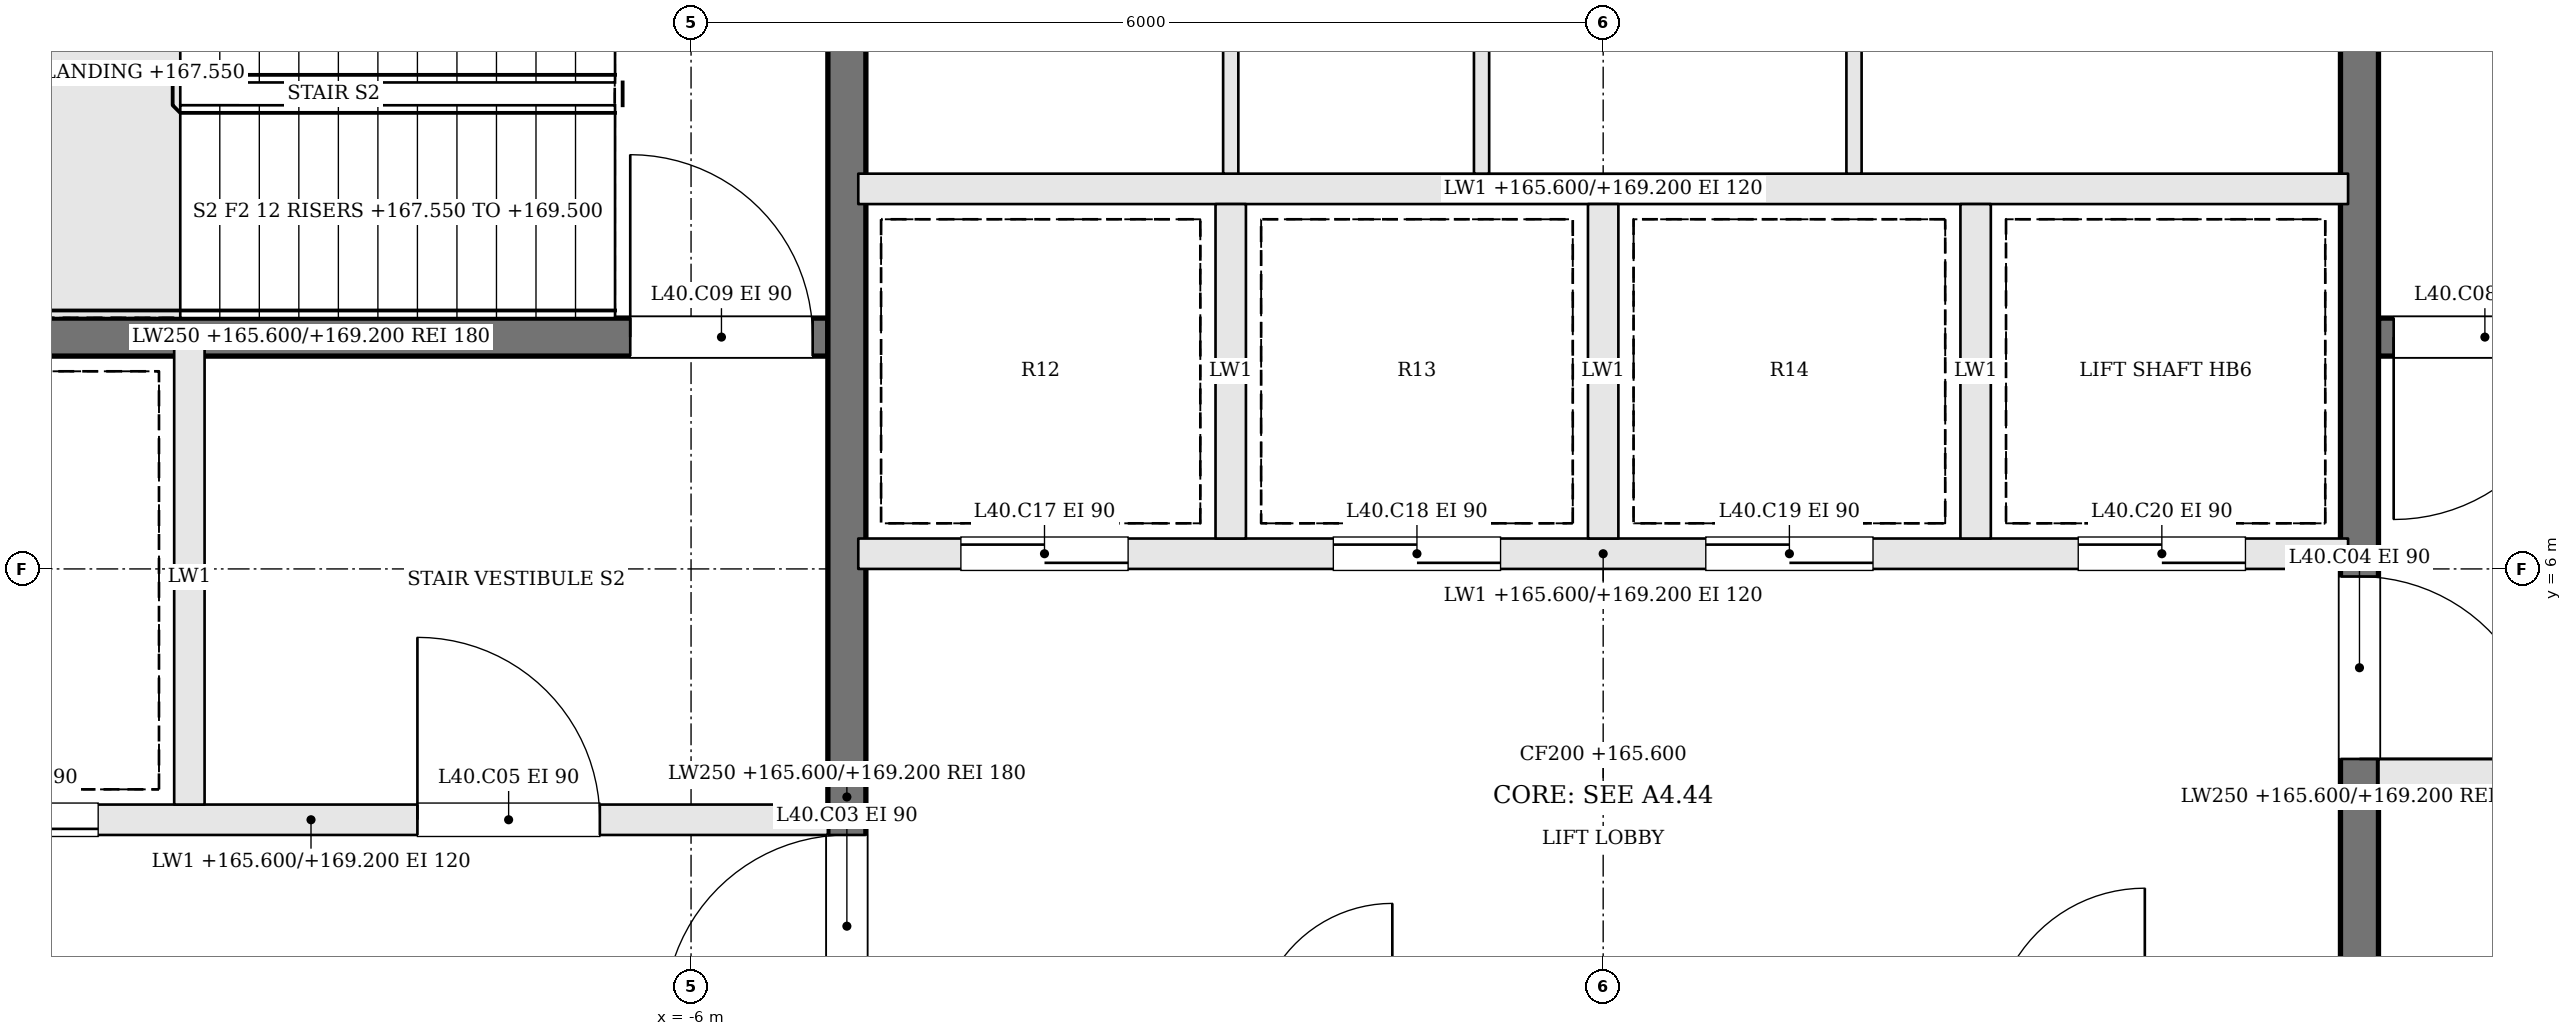
"""IFC4 building model, lengths in metres.
Left out: names, types, materials, properties, quantities, classifications, styles, units other than length and angle.
Written with IfcOpenShell. Run it as: python <this file> out.ifc"""

import sys

from ifc_helpers import new_model, si_unit, direction, frame, frame_2d, origin, place, context, subcontext, project, spatial, rectangle, extrude, element, fill, save


model = new_model("IFC4")
c1 = context("Model", 3, precision=1e-05, world=origin(), true_north=direction((0.0, 1.0)))
c2 = subcontext(c1, "Body", "Model", "MODEL_VIEW")
j1 = project(units=[si_unit("LENGTHUNIT", "METRE"), si_unit("PLANEANGLEUNIT", "RADIAN")], contexts=[c1])
p1 = place(None, origin())
s1 = spatial("IfcSite", under=j1, at=p1, CompositionType="ELEMENT")
p2 = place(p1, origin())
s2 = spatial("IfcBuilding", under=s1, at=p2, CompositionType="ELEMENT")
p3 = place(p2, frame((0.0, 0.0, 165.6)))
s3 = spatial("IfcBuildingStorey", under=s2, at=p3, CompositionType="ELEMENT", Elevation=165.6)
p4 = place(p3, frame((11.9, 7.525, 0.0), z_axis=(0.0, 0.0, 1.0), x_axis=(-1.0, 0.0, 0.0)))
e1 = element("IfcWall", 1, at=p4, inside=s3, PredefinedType="SOLIDWALL", context=c2, shape_type="SweptSolid", body=[
    extrude(rectangle(XDim=6.8, YDim=0.25, at=frame_2d((3.4, 0.0))), origin(), (0.0, 0.0, 1.0), 3.6),
])
p5 = place(p4, frame((5.5, 0.0, 0.0)))
e2 = element("IfcOpeningElement", 2, at=p5, cuts=e1, PredefinedType="OPENING", context=c2, shape_type="SweptSolid", body=[
    extrude(rectangle(XDim=1.2, YDim=2.1, at=frame_2d((0.6, 1.05))), frame((0.0, 0.135, 0.0), z_axis=(0.0, -1.0, 0.0), x_axis=(1.0, 0.0, 0.0)), (0.0, 0.0, 1.0), 0.27),
])
p6 = place(p3, frame((-11.9, 4.35, 0.0), z_axis=(0.0, 0.0, 1.0), x_axis=(1.0, 0.0, 0.0)))
e3 = element("IfcWall", 3, at=p6, inside=s3, PredefinedType="SOLIDWALL", context=c2, shape_type="SweptSolid", body=[
    extrude(rectangle(XDim=6.8, YDim=0.2, at=frame_2d((3.4, 0.0))), origin(), (0.0, 0.0, 1.0), 3.6),
])
p7 = place(p6, frame((4.1, 0.0, 0.0)))
e4 = element("IfcOpeningElement", 4, at=p7, cuts=e3, PredefinedType="OPENING", context=c2, shape_type="SweptSolid", body=[
    extrude(rectangle(XDim=1.2, YDim=2.1, at=frame_2d((0.6, 1.05))), frame((0.0, 0.11, 0.0), z_axis=(0.0, -1.0, 0.0), x_axis=(1.0, 0.0, 0.0)), (0.0, 0.0, 1.0), 0.22),
])
p8 = place(p6, frame((0.8, 0.0, 0.0)))
e5 = element("IfcOpeningElement", 5, at=p8, cuts=e3, PredefinedType="OPENING", context=c2, shape_type="SweptSolid", body=[
    extrude(rectangle(XDim=1.2, YDim=2.1, at=frame_2d((0.6, 1.05))), frame((0.0, 0.11, 0.0), z_axis=(0.0, -1.0, 0.0), x_axis=(1.0, 0.0, 0.0)), (0.0, 0.0, 1.0), 0.22),
])
p9 = place(p3, frame((11.9, 4.65, 0.0), z_axis=(0.0, 0.0, 1.0), x_axis=(-1.0, 0.0, 0.0)))
e6 = element("IfcWall", 6, at=p9, inside=s3, PredefinedType="SOLIDWALL", context=c2, shape_type="SweptSolid", body=[
    extrude(rectangle(XDim=6.8, YDim=0.2, at=frame_2d((3.4, 0.0))), origin(), (0.0, 0.0, 1.0), 3.6),
])
p10 = place(p9, frame((4.1, 0.0, 0.0)))
e7 = element("IfcOpeningElement", 7, at=p10, cuts=e6, PredefinedType="OPENING", context=c2, shape_type="SweptSolid", body=[
    extrude(rectangle(XDim=1.2, YDim=2.1, at=frame_2d((0.6, 1.05))), frame((0.0, 0.11, 0.0), z_axis=(0.0, -1.0, 0.0), x_axis=(1.0, 0.0, 0.0)), (0.0, 0.0, 1.0), 0.22),
])
p11 = place(p9, frame((0.8, 0.0, 0.0)))
e8 = element("IfcOpeningElement", 8, at=p11, cuts=e6, PredefinedType="OPENING", context=c2, shape_type="SweptSolid", body=[
    extrude(rectangle(XDim=1.2, YDim=2.1, at=frame_2d((0.6, 1.05))), frame((0.0, 0.11, 0.0), z_axis=(0.0, -1.0, 0.0), x_axis=(1.0, 0.0, 0.0)), (0.0, 0.0, 1.0), 0.22),
])
p12 = place(p3, frame((-11.9, 7.525, 0.0), z_axis=(0.0, 0.0, 1.0), x_axis=(1.0, 0.0, 0.0)))
e9 = element("IfcWall", 9, at=p12, inside=s3, PredefinedType="SOLIDWALL", context=c2, shape_type="SweptSolid", body=[
    extrude(rectangle(XDim=6.8, YDim=0.25, at=frame_2d((3.4, 0.0))), origin(), (0.0, 0.0, 1.0), 3.6),
])
p13 = place(p12, frame((5.5, 0.0, 0.0)))
e10 = element("IfcOpeningElement", 10, at=p13, cuts=e9, PredefinedType="OPENING", context=c2, shape_type="SweptSolid", body=[
    extrude(rectangle(XDim=1.2, YDim=2.1, at=frame_2d((0.6, 1.05))), frame((0.0, 0.135, 0.0), z_axis=(0.0, -1.0, 0.0), x_axis=(1.0, 0.0, 0.0)), (0.0, 0.0, 1.0), 0.27),
])
p14 = place(p3, frame((-9.3, 4.45, 0.0), z_axis=(0.0, 0.0, 1.0), x_axis=(0.0, 1.0, 0.0)))
e11 = element("IfcWall", 11, at=p14, inside=s3, PredefinedType="SOLIDWALL", context=c2, shape_type="SweptSolid", body=[
    extrude(rectangle(XDim=3.0, YDim=0.2, at=frame_2d((1.5, 0.0))), origin(), (0.0, 0.0, 1.0), 3.6),
])
p15 = place(p3, frame((-4.975, -1.9, 0.0), z_axis=(0.0, 0.0, 1.0), x_axis=(0.0, 1.0, 0.0)))
e12 = element("IfcWall", 12, at=p15, inside=s3, PredefinedType="SOLIDWALL", context=c2, shape_type="SweptSolid", body=[
    extrude(rectangle(XDim=12.8, YDim=0.25, at=frame_2d((6.4, 0.0))), origin(), (0.0, 0.0, 1.0), 3.6),
])
p16 = place(p15, frame((4.95, 0.0, 0.0)))
e13 = element("IfcOpeningElement", 13, at=p16, cuts=e12, PredefinedType="OPENING", context=c2, shape_type="SweptSolid", body=[
    extrude(rectangle(XDim=1.2, YDim=2.1, at=frame_2d((0.6, 1.05))), frame((0.0, 0.135, 0.0), z_axis=(0.0, -1.0, 0.0), x_axis=(1.0, 0.0, 0.0)), (0.0, 0.0, 1.0), 0.27),
])
p17 = place(p3, frame((4.975, 10.9, 0.0), z_axis=(0.0, 0.0, 1.0), x_axis=(0.0, -1.0, 0.0)))
e14 = element("IfcWall", 14, at=p17, inside=s3, PredefinedType="SOLIDWALL", context=c2, shape_type="SweptSolid", body=[
    extrude(rectangle(XDim=12.8, YDim=0.25, at=frame_2d((6.4, 0.0))), origin(), (0.0, 0.0, 1.0), 3.6),
])
p18 = place(p17, frame((4.95, 0.0, 0.0)))
e15 = element("IfcOpeningElement", 15, at=p18, cuts=e14, PredefinedType="OPENING", context=c2, shape_type="SweptSolid", body=[
    extrude(rectangle(XDim=1.2, YDim=2.1, at=frame_2d((0.6, 1.05))), frame((0.0, 0.135, 0.0), z_axis=(0.0, -1.0, 0.0), x_axis=(1.0, 0.0, 0.0)), (0.0, 0.0, 1.0), 0.27),
])
p19 = place(p3, frame((-4.9, 6.1, 0.0), z_axis=(0.0, 0.0, 1.0), x_axis=(1.0, 0.0, 0.0)))
e16 = element("IfcWall", 16, at=p19, inside=s3, PredefinedType="SOLIDWALL", context=c2, shape_type="SweptSolid", body=[
    extrude(rectangle(XDim=9.8, YDim=0.2, at=frame_2d((4.9, 0.0))), origin(), (0.0, 0.0, 1.0), 3.6),
])
p20 = place(p19, frame((0.675, 0.0, 0.0)))
e17 = element("IfcOpeningElement", 17, at=p20, cuts=e16, PredefinedType="OPENING", context=c2, shape_type="SweptSolid", body=[
    extrude(rectangle(XDim=1.1, YDim=2.1, at=frame_2d((0.55, 1.05))), frame((0.0, 0.11, 0.0), z_axis=(0.0, -1.0, 0.0), x_axis=(1.0, 0.0, 0.0)), (0.0, 0.0, 1.0), 0.22),
])
p21 = place(p19, frame((3.125, 0.0, 0.0)))
e18 = element("IfcOpeningElement", 18, at=p21, cuts=e16, PredefinedType="OPENING", context=c2, shape_type="SweptSolid", body=[
    extrude(rectangle(XDim=1.1, YDim=2.1, at=frame_2d((0.55, 1.05))), frame((0.0, 0.11, 0.0), z_axis=(0.0, -1.0, 0.0), x_axis=(1.0, 0.0, 0.0)), (0.0, 0.0, 1.0), 0.22),
])
p22 = place(p19, frame((5.575, 0.0, 0.0)))
e19 = element("IfcOpeningElement", 19, at=p22, cuts=e16, PredefinedType="OPENING", context=c2, shape_type="SweptSolid", body=[
    extrude(rectangle(XDim=1.1, YDim=2.1, at=frame_2d((0.55, 1.05))), frame((0.0, 0.11, 0.0), z_axis=(0.0, -1.0, 0.0), x_axis=(1.0, 0.0, 0.0)), (0.0, 0.0, 1.0), 0.22),
])
p23 = place(p19, frame((8.025, 0.0, 0.0)))
e20 = element("IfcOpeningElement", 20, at=p23, cuts=e16, PredefinedType="OPENING", context=c2, shape_type="SweptSolid", body=[
    extrude(rectangle(XDim=1.1, YDim=2.1, at=frame_2d((0.55, 1.05))), frame((0.0, 0.11, 0.0), z_axis=(0.0, -1.0, 0.0), x_axis=(1.0, 0.0, 0.0)), (0.0, 0.0, 1.0), 0.22),
])
p24 = place(p3, frame((-4.9, 8.5, 0.0), z_axis=(0.0, 0.0, 1.0), x_axis=(1.0, 0.0, 0.0)))
e21 = element("IfcWall", 21, at=p24, inside=s3, PredefinedType="SOLIDWALL", context=c2, shape_type="SweptSolid", body=[
    extrude(rectangle(XDim=9.8, YDim=0.2, at=frame_2d((4.9, 0.0))), origin(), (0.0, 0.0, 1.0), 3.6),
])
for number, where, z_axis, x_axis in (
    (22, (-2.45, 6.2, 0.0), (0.0, 0.0, 1.0), (0.0, 1.0, 0.0)),
    (23, (0.0, 6.2, 0.0), (0.0, 0.0, 1.0), (0.0, 1.0, 0.0)),
    (24, (2.45, 6.2, 0.0), (0.0, 0.0, 1.0), (0.0, 1.0, 0.0)),
):
    element("IfcWall", number, at=place(p3, frame(where, z_axis=z_axis, x_axis=x_axis)), inside=s3, PredefinedType="SOLIDWALL", context=c2, shape_type="SweptSolid", body=[
        extrude(rectangle(XDim=2.2, YDim=0.2, at=frame_2d((1.1, 0.0))), origin(), (0.0, 0.0, 1.0), 3.6),
    ])
for number, where, z_axis, x_axis in (
    (25, (-2.45, 8.6, 0.0), (0.0, 0.0, 1.0), (0.0, 1.0, 0.0)),
    (26, (-0.8, 8.6, 0.0), (0.0, 0.0, 1.0), (0.0, 1.0, 0.0)),
    (27, (1.65, 8.6, 0.0), (0.0, 0.0, 1.0), (0.0, 1.0, 0.0)),
):
    element("IfcWall", number, at=place(p3, frame(where, z_axis=z_axis, x_axis=x_axis)), inside=s3, PredefinedType="PARTITIONING", context=c2, shape_type="SweptSolid", body=[
        extrude(rectangle(XDim=2.3, YDim=0.1, at=frame_2d((1.15, 0.0))), origin(), (0.0, 0.0, 1.0), 3.6),
    ])
p25 = place(p16, origin())
e28 = element("IfcDoor", 28, at=p25, inside=s3, OperationType="SINGLE_SWING_LEFT", PredefinedType="DOOR", context=c2, shape_type="SweptSolid", body=[
    extrude(rectangle(XDim=1.2, YDim=2.1, at=frame_2d((0.6, 1.05))), frame((0.0, 0.025, 0.0), z_axis=(0.0, -1.0, 0.0), x_axis=(1.0, 0.0, 0.0)), (0.0, 0.0, 1.0), 0.05),
])
fill(e13, e28)
p26 = place(p18, origin())
e29 = element("IfcDoor", 29, at=p26, inside=s3, OperationType="SINGLE_SWING_RIGHT", PredefinedType="DOOR", context=c2, shape_type="SweptSolid", body=[
    extrude(rectangle(XDim=1.2, YDim=2.1, at=frame_2d((0.6, 1.05))), frame((0.0, 0.025, 0.0), z_axis=(0.0, -1.0, 0.0), x_axis=(1.0, 0.0, 0.0)), (0.0, 0.0, 1.0), 0.05),
])
fill(e15, e29)
p27 = place(p7, origin())
e30 = element("IfcDoor", 30, at=p27, inside=s3, OperationType="SINGLE_SWING_LEFT", PredefinedType="DOOR", context=c2, shape_type="SweptSolid", body=[
    extrude(rectangle(XDim=1.2, YDim=2.1, at=frame_2d((0.6, 1.05))), frame((0.0, 0.025, 0.0), z_axis=(0.0, -1.0, 0.0), x_axis=(1.0, 0.0, 0.0)), (0.0, 0.0, 1.0), 0.05),
])
fill(e4, e30)
p28 = place(p5, origin())
e31 = element("IfcDoor", 31, at=p28, inside=s3, OperationType="SINGLE_SWING_RIGHT", PredefinedType="DOOR", context=c2, shape_type="SweptSolid", body=[
    extrude(rectangle(XDim=1.2, YDim=2.1, at=frame_2d((0.6, 1.05))), frame((0.0, 0.025, 0.0), z_axis=(0.0, -1.0, 0.0), x_axis=(1.0, 0.0, 0.0)), (0.0, 0.0, 1.0), 0.05),
])
fill(e2, e31)
p29 = place(p13, origin())
e32 = element("IfcDoor", 32, at=p29, inside=s3, OperationType="SINGLE_SWING_LEFT", PredefinedType="DOOR", context=c2, shape_type="SweptSolid", body=[
    extrude(rectangle(XDim=1.2, YDim=2.1, at=frame_2d((0.6, 1.05))), frame((0.0, 0.025, 0.0), z_axis=(0.0, -1.0, 0.0), x_axis=(1.0, 0.0, 0.0)), (0.0, 0.0, 1.0), 0.05),
])
fill(e10, e32)
p30 = place(p8, origin())
e33 = element("IfcDoor", 33, at=p30, inside=s3, OperationType="SLIDING_TO_RIGHT", PredefinedType="DOOR", context=c2, shape_type="SweptSolid", body=[
    extrude(rectangle(XDim=1.2, YDim=2.1, at=frame_2d((0.6, 1.05))), frame((0.0, 0.025, 0.0), z_axis=(0.0, -1.0, 0.0), x_axis=(1.0, 0.0, 0.0)), (0.0, 0.0, 1.0), 0.05),
])
fill(e5, e33)
p31 = place(p20, origin())
e34 = element("IfcDoor", 34, at=p31, inside=s3, OperationType="SLIDING_TO_RIGHT", PredefinedType="DOOR", context=c2, shape_type="SweptSolid", body=[
    extrude(rectangle(XDim=1.1, YDim=2.1, at=frame_2d((0.55, 1.05))), frame((0.0, 0.025, 0.0), z_axis=(0.0, -1.0, 0.0), x_axis=(1.0, 0.0, 0.0)), (0.0, 0.0, 1.0), 0.05),
])
fill(e17, e34)
p32 = place(p21, origin())
e35 = element("IfcDoor", 35, at=p32, inside=s3, OperationType="SLIDING_TO_LEFT", PredefinedType="DOOR", context=c2, shape_type="SweptSolid", body=[
    extrude(rectangle(XDim=1.1, YDim=2.1, at=frame_2d((0.55, 1.05))), frame((0.0, 0.025, 0.0), z_axis=(0.0, -1.0, 0.0), x_axis=(1.0, 0.0, 0.0)), (0.0, 0.0, 1.0), 0.05),
])
fill(e18, e35)
p33 = place(p22, origin())
e36 = element("IfcDoor", 36, at=p33, inside=s3, OperationType="SLIDING_TO_RIGHT", PredefinedType="DOOR", context=c2, shape_type="SweptSolid", body=[
    extrude(rectangle(XDim=1.1, YDim=2.1, at=frame_2d((0.55, 1.05))), frame((0.0, 0.025, 0.0), z_axis=(0.0, -1.0, 0.0), x_axis=(1.0, 0.0, 0.0)), (0.0, 0.0, 1.0), 0.05),
])
fill(e19, e36)
p34 = place(p23, origin())
e37 = element("IfcDoor", 37, at=p34, inside=s3, OperationType="SLIDING_TO_LEFT", PredefinedType="DOOR", context=c2, shape_type="SweptSolid", body=[
    extrude(rectangle(XDim=1.1, YDim=2.1, at=frame_2d((0.55, 1.05))), frame((0.0, 0.025, 0.0), z_axis=(0.0, -1.0, 0.0), x_axis=(1.0, 0.0, 0.0)), (0.0, 0.0, 1.0), 0.05),
])
fill(e20, e37)
save(model, sys.argv[1])
